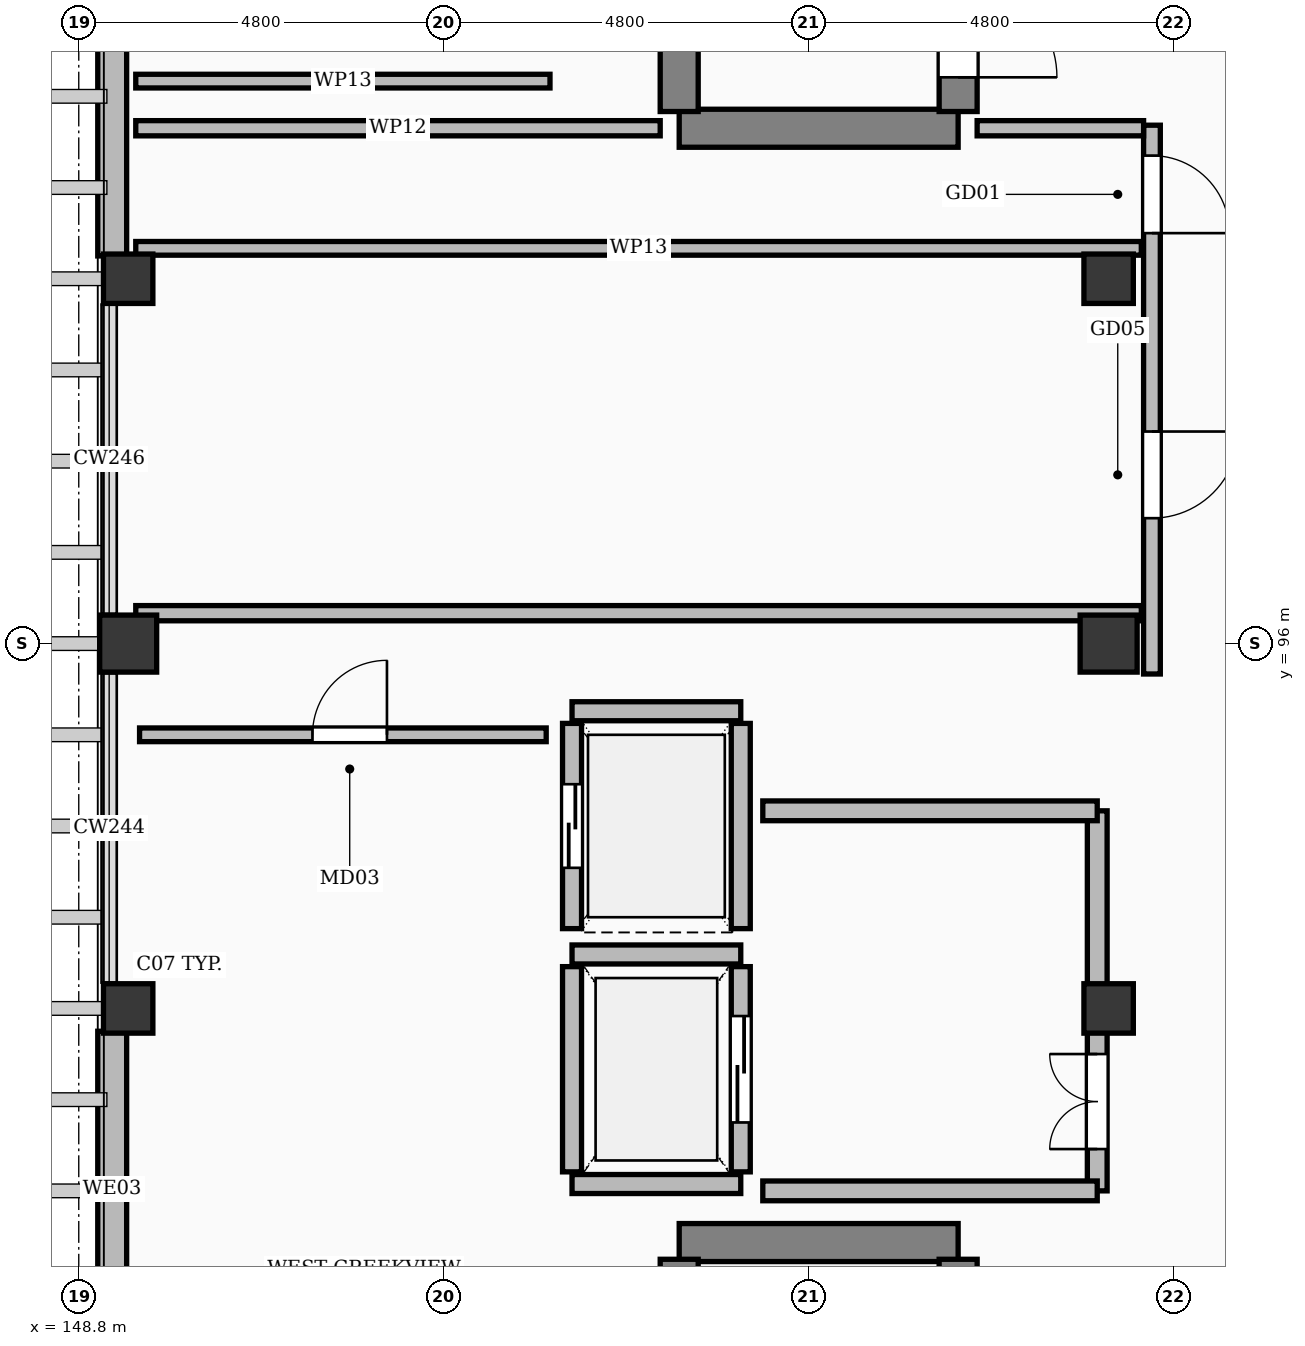
"""IFC4 building model, lengths in metres.
Left out: names, types, materials, properties, quantities, classifications, styles, units other than length and angle.
Written with IfcOpenShell. Run it as: python <this file> out.ifc"""

import sys

from ifc_helpers import new_model, si_unit, direction, frame, frame_2d, origin, origin_2d, place, context, subcontext, project, spatial, rectangle, extrude, element, fill, save


model = new_model("IFC4")
c1 = context("Model", 3, precision=1e-05, world=origin(), true_north=direction((0.0, 1.0)))
c2 = subcontext(c1, "Body", "Model", "MODEL_VIEW")
j1 = project(units=[si_unit("LENGTHUNIT", "METRE"), si_unit("PLANEANGLEUNIT", "RADIAN")], contexts=[c1])
p1 = place(None, origin())
s1 = spatial("IfcSite", under=j1, at=p1, CompositionType="ELEMENT")
p2 = place(p1, origin())
s2 = spatial("IfcBuilding", under=s1, at=p2, CompositionType="ELEMENT")
p3 = place(p2, frame((0.0, 0.0, 28.2)))
s3 = spatial("IfcBuildingStorey", under=s2, at=p3, CompositionType="ELEMENT", Elevation=28.2)
for number, where, z_axis, x_axis in (
    (1, (149.45, 96.0, 0.0), (0.0, 0.0, 1.0), (1.0, 0.0, 0.0)),
    (2, (162.35, 96.0, 0.0), (0.0, 0.0, 1.0), (1.0, 0.0, 0.0)),
):
    element("IfcColumn", number, at=place(p3, frame(where, z_axis=z_axis, x_axis=x_axis)), inside=s3, PredefinedType="COLUMN", context=c2, shape_type="SweptSolid", body=[
        extrude(rectangle(XDim=0.75, YDim=0.75, at=origin_2d()), origin(), (0.0, 0.0, 1.0), 3.6),
    ])
for number, where, z_axis, x_axis in (
    (3, (149.45, 91.2, 0.0), (0.0, 0.0, 1.0), (1.0, 0.0, 0.0)),
    (4, (149.45, 100.8, 0.0), (0.0, 0.0, 1.0), (1.0, 0.0, 0.0)),
    (5, (162.35, 91.2, 0.0), (0.0, 0.0, 1.0), (1.0, 0.0, 0.0)),
    (6, (162.35, 100.8, 0.0), (0.0, 0.0, 1.0), (1.0, 0.0, 0.0)),
):
    element("IfcColumn", number, at=place(p3, frame(where, z_axis=z_axis, x_axis=x_axis)), inside=s3, PredefinedType="COLUMN", context=c2, shape_type="SweptSolid", body=[
        extrude(rectangle(XDim=0.65, YDim=0.65, at=origin_2d()), origin(), (0.0, 0.0, 1.0), 3.6),
    ])
for number, where, z_axis, x_axis in (
    (7, (149.24, 86.75, 0.0), (0.0, 0.0, 1.0), (0.0, 1.0, 0.0)),
    (8, (149.24, 101.1, 0.0), (0.0, 0.0, 1.0), (0.0, 1.0, 0.0)),
):
    element("IfcWall", number, at=place(p3, frame(where, z_axis=z_axis, x_axis=x_axis)), inside=s3, PredefinedType="SOLIDWALL", context=c2, shape_type="SweptSolid", body=[
        extrude(rectangle(XDim=4.15, YDim=0.38, at=frame_2d((2.075, 0.0))), origin(), (0.0, 0.0, 1.0), 2.682),
    ])
p4 = place(p3, frame((156.7, 88.12, 0.0), z_axis=(0.0, 0.0, 1.0), x_axis=(1.0, 0.0, 0.0)))
e9 = element("IfcWall", 9, at=p4, inside=s3, PredefinedType="SHEAR", context=c2, shape_type="SweptSolid", body=[
    extrude(rectangle(XDim=3.67, YDim=0.5, at=frame_2d((1.835, 0.0))), origin(), (0.0, 0.0, 1.0), 3.34),
])
p5 = place(p3, frame((156.7, 77.4, 0.0), z_axis=(0.0, 0.0, 1.0), x_axis=(0.0, 1.0, 0.0)))
e10 = element("IfcWall", 10, at=p5, inside=s3, PredefinedType="SHEAR", context=c2, shape_type="SweptSolid", body=[
    extrude(rectangle(XDim=10.5, YDim=0.5, at=frame_2d((5.25, 0.0))), origin(), (0.0, 0.0, 1.0), 3.34),
])
p6 = place(p3, frame((160.37, 77.4, 0.0), z_axis=(0.0, 0.0, 1.0), x_axis=(0.0, 1.0, 0.0)))
e11 = element("IfcWall", 11, at=p6, inside=s3, PredefinedType="SHEAR", context=c2, shape_type="SweptSolid", body=[
    extrude(rectangle(XDim=10.5, YDim=0.5, at=frame_2d((5.25, 0.0))), origin(), (0.0, 0.0, 1.0), 3.34),
])
p7 = place(p6, frame((0.45, 0.0, 0.0)))
e12 = element("IfcOpeningElement", 12, at=p7, cuts=e11, PredefinedType="OPENING", context=c2, shape_type="SweptSolid", body=[
    extrude(rectangle(XDim=1.3, YDim=2.15, at=frame_2d((0.65, 1.075))), frame((0.0, 0.262, 0.0), z_axis=(0.0, -1.0, 0.0), x_axis=(1.0, 0.0, 0.0)), (0.0, 0.0, 1.0), 0.524),
])
for number, where, z_axis, x_axis in (
    (13, (155.29, 88.89, 0.0), (0.0, 0.0, 1.0), (1.0, 0.0, 0.0)),
    (14, (155.29, 91.91, 0.0), (0.0, 0.0, 1.0), (1.0, 0.0, 0.0)),
):
    element("IfcWall", number, at=place(p3, frame(where, z_axis=z_axis, x_axis=x_axis)), inside=s3, PredefinedType="SOLIDWALL", context=c2, shape_type="SweptSolid", body=[
        extrude(rectangle(XDim=2.22, YDim=0.25, at=frame_2d((1.11, 0.0))), origin(), (0.0, 0.0, 1.0), 3.34),
    ])
p8 = place(p3, frame((155.29, 89.05, 0.0), z_axis=(0.0, 0.0, 1.0), x_axis=(0.0, 1.0, 0.0)))
e15 = element("IfcWall", 15, at=p8, inside=s3, PredefinedType="SOLIDWALL", context=c2, shape_type="SweptSolid", body=[
    extrude(rectangle(XDim=2.7, YDim=0.25, at=frame_2d((1.35, 0.0))), origin(), (0.0, 0.0, 1.0), 2.682),
])
p9 = place(p3, frame((157.51, 89.05, 0.0), z_axis=(0.0, 0.0, 1.0), x_axis=(0.0, 1.0, 0.0)))
e16 = element("IfcWall", 16, at=p9, inside=s3, PredefinedType="SOLIDWALL", context=c2, shape_type="SweptSolid", body=[
    extrude(rectangle(XDim=2.7, YDim=0.25, at=frame_2d((1.35, 0.0))), origin(), (0.0, 0.0, 1.0), 2.682),
])
p10 = place(p9, frame((0.65, 0.0, 0.0)))
e17 = element("IfcOpeningElement", 17, at=p10, cuts=e16, PredefinedType="OPENING", context=c2, shape_type="SweptSolid", body=[
    extrude(rectangle(XDim=1.4, YDim=2.3, at=frame_2d((0.7, 1.15))), frame((0.0, 0.137, 0.0), z_axis=(0.0, -1.0, 0.0), x_axis=(1.0, 0.0, 0.0)), (0.0, 0.0, 1.0), 0.274),
])
p11 = place(p3, frame((155.29, 95.11, 0.0), z_axis=(0.0, 0.0, 1.0), x_axis=(1.0, 0.0, 0.0)))
e18 = element("IfcWall", 18, at=p11, inside=s3, PredefinedType="SOLIDWALL", context=c2, shape_type="SweptSolid", body=[
    extrude(rectangle(XDim=2.22, YDim=0.25, at=frame_2d((1.11, 0.0))), origin(), (0.0, 0.0, 1.0), 3.34),
])
p12 = place(p3, frame((155.29, 92.25, 0.0), z_axis=(0.0, 0.0, 1.0), x_axis=(0.0, 1.0, 0.0)))
e19 = element("IfcWall", 19, at=p12, inside=s3, PredefinedType="SOLIDWALL", context=c2, shape_type="SweptSolid", body=[
    extrude(rectangle(XDim=2.7, YDim=0.25, at=frame_2d((1.35, 0.0))), origin(), (0.0, 0.0, 1.0), 3.34),
])
p13 = place(p12, frame((0.8, 0.0, 0.0)))
e20 = element("IfcOpeningElement", 20, at=p13, cuts=e19, PredefinedType="OPENING", context=c2, shape_type="SweptSolid", body=[
    extrude(rectangle(XDim=1.1, YDim=2.2, at=frame_2d((0.55, 1.1))), frame((0.0, 0.137, 0.0), z_axis=(0.0, -1.0, 0.0), x_axis=(1.0, 0.0, 0.0)), (0.0, 0.0, 1.0), 0.274),
])
p14 = place(p3, frame((157.51, 92.25, 0.0), z_axis=(0.0, 0.0, 1.0), x_axis=(0.0, 1.0, 0.0)))
e21 = element("IfcWall", 21, at=p14, inside=s3, PredefinedType="SOLIDWALL", context=c2, shape_type="SweptSolid", body=[
    extrude(rectangle(XDim=2.7, YDim=0.25, at=frame_2d((1.35, 0.0))), origin(), (0.0, 0.0, 1.0), 3.34),
])
p15 = place(p3, frame((162.2, 88.8, 0.0), z_axis=(0.0, 0.0, 1.0), x_axis=(0.0, 1.0, 0.0)))
e22 = element("IfcWall", 22, at=p15, inside=s3, PredefinedType="SOLIDWALL", context=c2, shape_type="SweptSolid", body=[
    extrude(rectangle(XDim=5.0, YDim=0.26, at=frame_2d((2.5, 0.0))), origin(), (0.0, 0.0, 1.0), 2.682),
])
p16 = place(p15, frame((0.55, 0.0, 0.0)))
e23 = element("IfcOpeningElement", 23, at=p16, cuts=e22, PredefinedType="OPENING", context=c2, shape_type="SweptSolid", body=[
    extrude(rectangle(XDim=1.25, YDim=2.15, at=frame_2d((0.625, 1.075))), frame((0.0, 0.142, 0.0), z_axis=(0.0, -1.0, 0.0), x_axis=(1.0, 0.0, 0.0)), (0.0, 0.0, 1.0), 0.284),
])
for number, where, z_axis, x_axis in (
    (24, (157.8, 88.8, 0.0), (0.0, 0.0, 1.0), (1.0, 0.0, 0.0)),
    (25, (157.8, 93.8, 0.0), (0.0, 0.0, 1.0), (1.0, 0.0, 0.0)),
):
    element("IfcWall", number, at=place(p3, frame(where, z_axis=z_axis, x_axis=x_axis)), inside=s3, PredefinedType="SOLIDWALL", context=c2, shape_type="SweptSolid", body=[
        extrude(rectangle(XDim=4.4, YDim=0.26, at=frame_2d((2.2, 0.0))), origin(), (0.0, 0.0, 1.0), 2.682),
    ])
p17 = place(p3, frame((156.7, 102.78, 0.0), z_axis=(0.0, 0.0, 1.0), x_axis=(1.0, 0.0, 0.0)))
e26 = element("IfcWall", 26, at=p17, inside=s3, PredefinedType="SHEAR", context=c2, shape_type="SweptSolid", body=[
    extrude(rectangle(XDim=3.67, YDim=0.5, at=frame_2d((1.835, 0.0))), origin(), (0.0, 0.0, 1.0), 3.34),
])
p18 = place(p3, frame((156.7, 103.0, 0.0), z_axis=(0.0, 0.0, 1.0), x_axis=(0.0, 1.0, 0.0)))
e27 = element("IfcWall", 27, at=p18, inside=s3, PredefinedType="SHEAR", context=c2, shape_type="SweptSolid", body=[
    extrude(rectangle(XDim=10.5, YDim=0.5, at=frame_2d((5.25, 0.0))), origin(), (0.0, 0.0, 1.0), 3.34),
])
p19 = place(p3, frame((160.37, 103.0, 0.0), z_axis=(0.0, 0.0, 1.0), x_axis=(0.0, 1.0, 0.0)))
e28 = element("IfcWall", 28, at=p19, inside=s3, PredefinedType="SHEAR", context=c2, shape_type="SweptSolid", body=[
    extrude(rectangle(XDim=10.5, YDim=0.5, at=frame_2d((5.25, 0.0))), origin(), (0.0, 0.0, 1.0), 3.34),
])
p20 = place(p19, frame((0.45, 0.0, 0.0)))
e29 = element("IfcOpeningElement", 29, at=p20, cuts=e28, PredefinedType="OPENING", context=c2, shape_type="SweptSolid", body=[
    extrude(rectangle(XDim=1.3, YDim=2.15, at=frame_2d((0.65, 1.075))), frame((0.0, 0.262, 0.0), z_axis=(0.0, -1.0, 0.0), x_axis=(1.0, 0.0, 0.0)), (0.0, 0.0, 1.0), 0.524),
])
p21 = place(p3, frame((162.92, 95.6, 0.0), z_axis=(0.0, 0.0, 1.0), x_axis=(0.0, 1.0, 0.0)))
e30 = element("IfcWall", 30, at=p21, inside=s3, PredefinedType="PARTITIONING", context=c2, shape_type="SweptSolid", body=[
    extrude(rectangle(XDim=7.22, YDim=0.22, at=frame_2d((3.61, 0.0))), origin(), (0.0, 0.0, 1.0), 2.682),
])
p22 = place(p21, frame((2.05, 0.0, 0.0)))
e31 = element("IfcOpeningElement", 31, at=p22, cuts=e30, PredefinedType="OPENING", context=c2, shape_type="SweptSolid", body=[
    extrude(rectangle(XDim=1.14, YDim=2.26, at=frame_2d((0.57, 1.13))), frame((0.0, 0.122, 0.0), z_axis=(0.0, -1.0, 0.0), x_axis=(1.0, 0.0, 0.0)), (0.0, 0.0, 1.0), 0.244),
])
p23 = place(p21, frame((5.8, 0.0, 0.0)))
e32 = element("IfcOpeningElement", 32, at=p23, cuts=e30, PredefinedType="OPENING", context=c2, shape_type="SweptSolid", body=[
    extrude(rectangle(XDim=1.02, YDim=2.2, at=frame_2d((0.51, 1.1))), frame((0.0, 0.122, 0.0), z_axis=(0.0, -1.0, 0.0), x_axis=(1.0, 0.0, 0.0)), (0.0, 0.0, 1.0), 0.244),
])
p24 = place(p3, frame((149.55, 96.4, 0.0), z_axis=(0.0, 0.0, 1.0), x_axis=(1.0, 0.0, 0.0)))
e33 = element("IfcWall", 33, at=p24, inside=s3, PredefinedType="PARTITIONING", context=c2, shape_type="SweptSolid", body=[
    extrude(rectangle(XDim=13.23, YDim=0.2, at=frame_2d((6.615, 0.0))), origin(), (0.0, 0.0, 1.0), 2.682),
])
p25 = place(p3, frame((149.55, 101.2, 0.0), z_axis=(0.0, 0.0, 1.0), x_axis=(1.0, 0.0, 0.0)))
e34 = element("IfcWall", 34, at=p25, inside=s3, PredefinedType="PARTITIONING", context=c2, shape_type="SweptSolid", body=[
    extrude(rectangle(XDim=13.23, YDim=0.18, at=frame_2d((6.615, 0.0))), origin(), (0.0, 0.0, 1.0), 2.682),
])
p26 = place(p3, frame((149.55, 102.78, 0.0), z_axis=(0.0, 0.0, 1.0), x_axis=(1.0, 0.0, 0.0)))
e35 = element("IfcWall", 35, at=p26, inside=s3, PredefinedType="PARTITIONING", context=c2, shape_type="SweptSolid", body=[
    extrude(rectangle(XDim=6.9, YDim=0.2, at=frame_2d((3.45, 0.0))), origin(), (0.0, 0.0, 1.0), 2.682),
])
p27 = place(p3, frame((160.62, 102.78, 0.0), z_axis=(0.0, 0.0, 1.0), x_axis=(1.0, 0.0, 0.0)))
e36 = element("IfcWall", 36, at=p27, inside=s3, PredefinedType="PARTITIONING", context=c2, shape_type="SweptSolid", body=[
    extrude(rectangle(XDim=2.19, YDim=0.2, at=frame_2d((1.095, 0.0))), origin(), (0.0, 0.0, 1.0), 2.682),
])
p28 = place(p3, frame((149.6, 94.8, 0.0), z_axis=(0.0, 0.0, 1.0), x_axis=(1.0, 0.0, 0.0)))
e37 = element("IfcWall", 37, at=p28, inside=s3, PredefinedType="PARTITIONING", context=c2, shape_type="SweptSolid", body=[
    extrude(rectangle(XDim=5.35, YDim=0.18, at=frame_2d((2.675, 0.0))), origin(), (0.0, 0.0, 1.0), 2.682),
])
p29 = place(p28, frame((2.275, 0.0, 0.0)))
e38 = element("IfcOpeningElement", 38, at=p29, cuts=e37, PredefinedType="OPENING", context=c2, shape_type="SweptSolid", body=[
    extrude(rectangle(XDim=0.98, YDim=2.15, at=frame_2d((0.49, 1.075))), frame((0.0, 0.102, 0.0), z_axis=(0.0, -1.0, 0.0), x_axis=(1.0, 0.0, 0.0)), (0.0, 0.0, 1.0), 0.204),
])
p30 = place(p3, frame((149.55, 103.4, 0.0), z_axis=(0.0, 0.0, 1.0), x_axis=(1.0, 0.0, 0.0)))
e39 = element("IfcWall", 39, at=p30, inside=s3, PredefinedType="PARTITIONING", context=c2, shape_type="SweptSolid", body=[
    extrude(rectangle(XDim=5.45, YDim=0.18, at=frame_2d((2.725, 0.0))), origin(), (0.0, 0.0, 1.0), 2.682),
])
p31 = place(p10, origin())
e40 = element("IfcDoor", 40, at=p31, inside=s3, OperationType="SLIDING_TO_LEFT", PredefinedType="DOOR", context=c2, shape_type="SweptSolid", body=[
    extrude(rectangle(XDim=1.4, YDim=2.3, at=frame_2d((0.7, 1.15))), frame((0.0, 0.025, 0.0), z_axis=(0.0, -1.0, 0.0), x_axis=(1.0, 0.0, 0.0)), (0.0, 0.0, 1.0), 0.05),
])
fill(e17, e40)
p32 = place(p13, origin())
e41 = element("IfcDoor", 41, at=p32, inside=s3, OperationType="SLIDING_TO_LEFT", PredefinedType="DOOR", context=c2, shape_type="SweptSolid", body=[
    extrude(rectangle(XDim=1.1, YDim=2.2, at=frame_2d((0.55, 1.1))), frame((0.0, 0.025, 0.0), z_axis=(0.0, -1.0, 0.0), x_axis=(1.0, 0.0, 0.0)), (0.0, 0.0, 1.0), 0.05),
])
fill(e20, e41)
p33 = place(p16, origin())
e42 = element("IfcDoor", 42, at=p33, inside=s3, OperationType="DOUBLE_DOOR_SINGLE_SWING", PredefinedType="DOOR", context=c2, shape_type="SweptSolid", body=[
    extrude(rectangle(XDim=1.25, YDim=2.15, at=frame_2d((0.625, 1.075))), frame((0.0, 0.025, 0.0), z_axis=(0.0, -1.0, 0.0), x_axis=(1.0, 0.0, 0.0)), (0.0, 0.0, 1.0), 0.05),
])
fill(e23, e42)
p34 = place(p20, frame((1.3, 0.0, 0.0), z_axis=(0.0, 0.0, 1.0), x_axis=(-1.0, 0.0, 0.0)))
e43 = element("IfcDoor", 43, at=p34, inside=s3, OperationType="SINGLE_SWING_LEFT", PredefinedType="DOOR", context=c2, shape_type="SweptSolid", body=[
    extrude(rectangle(XDim=1.3, YDim=2.15, at=frame_2d((0.65, 1.075))), frame((0.0, 0.025, 0.0), z_axis=(0.0, -1.0, 0.0), x_axis=(1.0, 0.0, 0.0)), (0.0, 0.0, 1.0), 0.05),
])
fill(e29, e43)
p35 = place(p22, frame((1.14, 0.0, 0.0), z_axis=(0.0, 0.0, 1.0), x_axis=(-1.0, 0.0, 0.0)))
e44 = element("IfcDoor", 44, at=p35, inside=s3, OperationType="SINGLE_SWING_RIGHT", PredefinedType="DOOR", context=c2, shape_type="SweptSolid", body=[
    extrude(rectangle(XDim=1.14, YDim=2.26, at=frame_2d((0.57, 1.13))), frame((0.0, 0.025, 0.0), z_axis=(0.0, -1.0, 0.0), x_axis=(1.0, 0.0, 0.0)), (0.0, 0.0, 1.0), 0.05),
])
fill(e31, e44)
p36 = place(p23, frame((1.02, 0.0, 0.0), z_axis=(0.0, 0.0, 1.0), x_axis=(-1.0, 0.0, 0.0)))
e45 = element("IfcDoor", 45, at=p36, inside=s3, OperationType="SINGLE_SWING_LEFT", PredefinedType="DOOR", context=c2, shape_type="SweptSolid", body=[
    extrude(rectangle(XDim=1.02, YDim=2.2, at=frame_2d((0.51, 1.1))), frame((0.0, 0.025, 0.0), z_axis=(0.0, -1.0, 0.0), x_axis=(1.0, 0.0, 0.0)), (0.0, 0.0, 1.0), 0.05),
])
fill(e32, e45)
p37 = place(p29, origin())
e46 = element("IfcDoor", 46, at=p37, inside=s3, OperationType="SINGLE_SWING_RIGHT", PredefinedType="DOOR", context=c2, shape_type="SweptSolid", body=[
    extrude(rectangle(XDim=0.98, YDim=2.15, at=frame_2d((0.49, 1.075))), frame((0.0, 0.025, 0.0), z_axis=(0.0, -1.0, 0.0), x_axis=(1.0, 0.0, 0.0)), (0.0, 0.0, 1.0), 0.05),
])
fill(e38, e46)
save(model, sys.argv[1])
